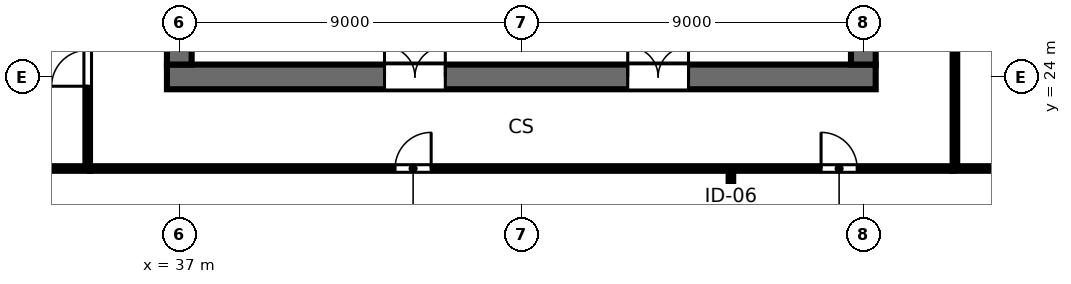
"""IFC4 building model, lengths in metres.
Left out: names, types, materials, properties, quantities, classifications, styles, units other than length and angle.
Written with IfcOpenShell. Run it as: python <this file> out.ifc"""

import sys

from ifc_helpers import new_model, si_unit, direction, frame, frame_2d, origin, place, context, subcontext, project, spatial, rectangle, extrude, element, fill, save


model = new_model("IFC4")
c1 = context("Model", 3, precision=1e-05, world=origin(), true_north=direction((0.0, 1.0)))
c2 = subcontext(c1, "Body", "Model", "MODEL_VIEW")
j1 = project(units=[si_unit("LENGTHUNIT", "METRE"), si_unit("PLANEANGLEUNIT", "RADIAN")], contexts=[c1])
p1 = place(None, origin())
s1 = spatial("IfcSite", under=j1, at=p1, CompositionType="ELEMENT")
p2 = place(p1, origin())
s2 = spatial("IfcBuilding", under=s1, at=p2, CompositionType="ELEMENT")
p3 = place(p2, frame((0.0, 0.0, 18.5)))
s3 = spatial("IfcBuildingStorey", under=s2, at=p3, CompositionType="ELEMENT", Elevation=18.5)
p4 = place(p3, frame((36.675, 24.0, 0.0), z_axis=(0.0, 0.0, 1.0), x_axis=(1.0, 0.0, 0.0)))
e1 = element("IfcWall", 1, at=p4, inside=s3, PredefinedType="SHEAR", context=c2, shape_type="SweptSolid", body=[
    extrude(rectangle(XDim=18.65, YDim=0.65, at=frame_2d((9.325, 0.0))), origin(), (0.0, 0.0, 1.0), 4.05),
])
p5 = place(p4, frame((5.725, 0.0, 0.0)))
e2 = element("IfcOpeningElement", 2, at=p5, cuts=e1, PredefinedType="OPENING", context=c2, shape_type="SweptSolid", body=[
    extrude(rectangle(XDim=1.6, YDim=2.15, at=frame_2d((0.8, 1.075))), frame((0.0, 0.335, 0.0), z_axis=(0.0, -1.0, 0.0), x_axis=(1.0, 0.0, 0.0)), (0.0, 0.0, 1.0), 0.67),
])
p6 = place(p4, frame((12.125, 0.0, 0.0)))
e3 = element("IfcOpeningElement", 3, at=p6, cuts=e1, PredefinedType="OPENING", context=c2, shape_type="SweptSolid", body=[
    extrude(rectangle(XDim=1.6, YDim=2.15, at=frame_2d((0.8, 1.075))), frame((0.0, 0.335, 0.0), z_axis=(0.0, -1.0, 0.0), x_axis=(1.0, 0.0, 0.0)), (0.0, 0.0, 1.0), 0.67),
])
p7 = place(p3, frame((37.0, 24.325, 0.0), z_axis=(0.0, 0.0, 1.0), x_axis=(0.0, 1.0, 0.0)))
e4 = element("IfcWall", 4, at=p7, inside=s3, PredefinedType="SHEAR", context=c2, shape_type="SweptSolid", body=[
    extrude(rectangle(XDim=15.35, YDim=0.65, at=frame_2d((7.675, 0.0))), origin(), (0.0, 0.0, 1.0), 4.05),
])
p8 = place(p7, frame((5.2, 0.0, 0.0)))
e5 = element("IfcOpeningElement", 5, at=p8, cuts=e4, PredefinedType="OPENING", context=c2, shape_type="SweptSolid", body=[
    extrude(rectangle(XDim=1.15, YDim=2.15, at=frame_2d((0.575, 1.075))), frame((0.0, 0.335, 0.0), z_axis=(0.0, -1.0, 0.0), x_axis=(1.0, 0.0, 0.0)), (0.0, 0.0, 1.0), 0.67),
])
p9 = place(p3, frame((55.0, 24.325, 0.0), z_axis=(0.0, 0.0, 1.0), x_axis=(0.0, 1.0, 0.0)))
e6 = element("IfcWall", 6, at=p9, inside=s3, PredefinedType="SHEAR", context=c2, shape_type="SweptSolid", body=[
    extrude(rectangle(XDim=15.35, YDim=0.65, at=frame_2d((7.675, 0.0))), origin(), (0.0, 0.0, 1.0), 4.05),
])
p10 = place(p9, frame((5.2, 0.0, 0.0)))
e7 = element("IfcOpeningElement", 7, at=p10, cuts=e6, PredefinedType="OPENING", context=c2, shape_type="SweptSolid", body=[
    extrude(rectangle(XDim=1.15, YDim=2.15, at=frame_2d((0.575, 1.075))), frame((0.0, 0.335, 0.0), z_axis=(0.0, -1.0, 0.0), x_axis=(1.0, 0.0, 0.0)), (0.0, 0.0, 1.0), 0.67),
])
p11 = place(p3, frame((51.515, 21.59, 0.0), z_axis=(0.0, 0.0, 1.0), x_axis=(0.0, -1.0, 0.0)))
e8 = element("IfcWall", 8, at=p11, inside=s3, PredefinedType="PARTITIONING", context=c2, shape_type="SweptSolid", body=[
    extrude(rectangle(XDim=12.25, YDim=0.12, at=frame_2d((6.125, 0.0))), origin(), (0.0, 0.0, 1.0), 2.89),
])
p12 = place(p11, frame((1.4, 0.0, 0.0)))
e9 = element("IfcOpeningElement", 9, at=p12, cuts=e8, PredefinedType="OPENING", context=c2, shape_type="SweptSolid", body=[
    extrude(rectangle(XDim=0.9, YDim=2.15, at=frame_2d((0.45, 1.075))), frame((0.0, 0.07, 0.0), z_axis=(0.0, -1.0, 0.0), x_axis=(1.0, 0.0, 0.0)), (0.0, 0.0, 1.0), 0.14),
])
p13 = place(p3, frame((34.65, 21.59, 0.0), z_axis=(0.0, 0.0, 1.0), x_axis=(1.0, 0.0, 0.0)))
e10 = element("IfcWall", 10, at=p13, inside=s3, PredefinedType="PARTITIONING", context=c2, shape_type="SweptSolid", body=[
    extrude(rectangle(XDim=22.7, YDim=0.12, at=frame_2d((11.35, 0.0))), origin(), (0.0, 0.0, 1.0), 2.89),
])
p14 = place(p13, frame((8.028, 0.0, 0.0)))
e11 = element("IfcOpeningElement", 11, at=p14, cuts=e10, PredefinedType="OPENING", context=c2, shape_type="SweptSolid", body=[
    extrude(rectangle(XDim=0.95, YDim=2.15, at=frame_2d((0.475, 1.075))), frame((0.0, 0.07, 0.0), z_axis=(0.0, -1.0, 0.0), x_axis=(1.0, 0.0, 0.0)), (0.0, 0.0, 1.0), 0.14),
])
p15 = place(p13, frame((19.238, 0.0, 0.0)))
e12 = element("IfcOpeningElement", 12, at=p15, cuts=e10, PredefinedType="OPENING", context=c2, shape_type="SweptSolid", body=[
    extrude(rectangle(XDim=0.95, YDim=2.15, at=frame_2d((0.475, 1.075))), frame((0.0, 0.07, 0.0), z_axis=(0.0, -1.0, 0.0), x_axis=(1.0, 0.0, 0.0)), (0.0, 0.0, 1.0), 0.14),
])
p16 = place(p3, frame((34.59, 21.65, 0.0), z_axis=(0.0, 0.0, 1.0), x_axis=(0.0, 1.0, 0.0)))
e13 = element("IfcWall", 13, at=p16, inside=s3, PredefinedType="PARTITIONING", context=c2, shape_type="SweptSolid", body=[
    extrude(rectangle(XDim=20.7, YDim=0.12, at=frame_2d((10.35, 0.0))), origin(), (0.0, 0.0, 1.0), 2.89),
])
p17 = place(p16, frame((2.105, 0.0, 0.0)))
e14 = element("IfcOpeningElement", 14, at=p17, cuts=e13, PredefinedType="OPENING", context=c2, shape_type="SweptSolid", body=[
    extrude(rectangle(XDim=0.95, YDim=2.15, at=frame_2d((0.475, 1.075))), frame((0.0, 0.07, 0.0), z_axis=(0.0, -1.0, 0.0), x_axis=(1.0, 0.0, 0.0)), (0.0, 0.0, 1.0), 0.14),
])
p18 = place(p16, frame((7.369, 0.0, 0.0)))
e15 = element("IfcOpeningElement", 15, at=p18, cuts=e13, PredefinedType="OPENING", context=c2, shape_type="SweptSolid", body=[
    extrude(rectangle(XDim=0.95, YDim=2.15, at=frame_2d((0.475, 1.075))), frame((0.0, 0.07, 0.0), z_axis=(0.0, -1.0, 0.0), x_axis=(1.0, 0.0, 0.0)), (0.0, 0.0, 1.0), 0.14),
])
p19 = place(p16, frame((15.139, 0.0, 0.0)))
e16 = element("IfcOpeningElement", 16, at=p19, cuts=e13, PredefinedType="OPENING", context=c2, shape_type="SweptSolid", body=[
    extrude(rectangle(XDim=0.95, YDim=2.15, at=frame_2d((0.475, 1.075))), frame((0.0, 0.07, 0.0), z_axis=(0.0, -1.0, 0.0), x_axis=(1.0, 0.0, 0.0)), (0.0, 0.0, 1.0), 0.14),
])
p20 = place(p3, frame((57.41, 21.65, 0.0), z_axis=(0.0, 0.0, 1.0), x_axis=(0.0, 1.0, 0.0)))
e17 = element("IfcWall", 17, at=p20, inside=s3, PredefinedType="PARTITIONING", context=c2, shape_type="SweptSolid", body=[
    extrude(rectangle(XDim=20.7, YDim=0.12, at=frame_2d((10.35, 0.0))), origin(), (0.0, 0.0, 1.0), 2.89),
])
p21 = place(p20, frame((9.875, 0.0, 0.0)))
e18 = element("IfcOpeningElement", 18, at=p21, cuts=e17, PredefinedType="OPENING", context=c2, shape_type="SweptSolid", body=[
    extrude(rectangle(XDim=0.95, YDim=2.15, at=frame_2d((0.475, 1.075))), frame((0.0, 0.07, 0.0), z_axis=(0.0, -1.0, 0.0), x_axis=(1.0, 0.0, 0.0)), (0.0, 0.0, 1.0), 0.14),
])
for number, where, z_axis, x_axis in (
    (19, (34.65, 21.59, 0.0), (0.0, 0.0, 1.0), (-1.0, 0.0, 0.0)),
    (20, (57.35, 21.59, 0.0), (0.0, 0.0, 1.0), (1.0, 0.0, 0.0)),
):
    element("IfcWall", number, at=place(p3, frame(where, z_axis=z_axis, x_axis=x_axis)), inside=s3, PredefinedType="PARTITIONING", context=c2, shape_type="SweptSolid", body=[
        extrude(rectangle(XDim=18.71, YDim=0.12, at=frame_2d((9.355, 0.0))), origin(), (0.0, 0.0, 1.0), 2.89),
    ])
p22 = place(p5, origin())
e21 = element("IfcDoor", 21, at=p22, inside=s3, OperationType="DOUBLE_DOOR_SINGLE_SWING", PredefinedType="DOOR", context=c2, shape_type="SweptSolid", body=[
    extrude(rectangle(XDim=1.6, YDim=2.15, at=frame_2d((0.8, 1.075))), frame((0.0, 0.025, 0.0), z_axis=(0.0, -1.0, 0.0), x_axis=(1.0, 0.0, 0.0)), (0.0, 0.0, 1.0), 0.05),
])
fill(e2, e21)
p23 = place(p6, origin())
e22 = element("IfcDoor", 22, at=p23, inside=s3, OperationType="DOUBLE_DOOR_SINGLE_SWING", PredefinedType="DOOR", context=c2, shape_type="SweptSolid", body=[
    extrude(rectangle(XDim=1.6, YDim=2.15, at=frame_2d((0.8, 1.075))), frame((0.0, 0.025, 0.0), z_axis=(0.0, -1.0, 0.0), x_axis=(1.0, 0.0, 0.0)), (0.0, 0.0, 1.0), 0.05),
])
fill(e3, e22)
p24 = place(p14, origin())
e23 = element("IfcDoor", 23, at=p24, inside=s3, OperationType="SINGLE_SWING_RIGHT", PredefinedType="DOOR", context=c2, shape_type="SweptSolid", body=[
    extrude(rectangle(XDim=0.95, YDim=2.15, at=frame_2d((0.475, 1.075))), frame((0.0, 0.025, 0.0), z_axis=(0.0, -1.0, 0.0), x_axis=(1.0, 0.0, 0.0)), (0.0, 0.0, 1.0), 0.05),
])
fill(e11, e23)
p25 = place(p15, origin())
e24 = element("IfcDoor", 24, at=p25, inside=s3, OperationType="SINGLE_SWING_LEFT", PredefinedType="DOOR", context=c2, shape_type="SweptSolid", body=[
    extrude(rectangle(XDim=0.95, YDim=2.15, at=frame_2d((0.475, 1.075))), frame((0.0, 0.025, 0.0), z_axis=(0.0, -1.0, 0.0), x_axis=(1.0, 0.0, 0.0)), (0.0, 0.0, 1.0), 0.05),
])
fill(e12, e24)
p26 = place(p17, origin())
e25 = element("IfcDoor", 25, at=p26, inside=s3, OperationType="SINGLE_SWING_LEFT", PredefinedType="DOOR", context=c2, shape_type="SweptSolid", body=[
    extrude(rectangle(XDim=0.95, YDim=2.15, at=frame_2d((0.475, 1.075))), frame((0.0, 0.025, 0.0), z_axis=(0.0, -1.0, 0.0), x_axis=(1.0, 0.0, 0.0)), (0.0, 0.0, 1.0), 0.05),
])
fill(e14, e25)
save(model, sys.argv[1])
